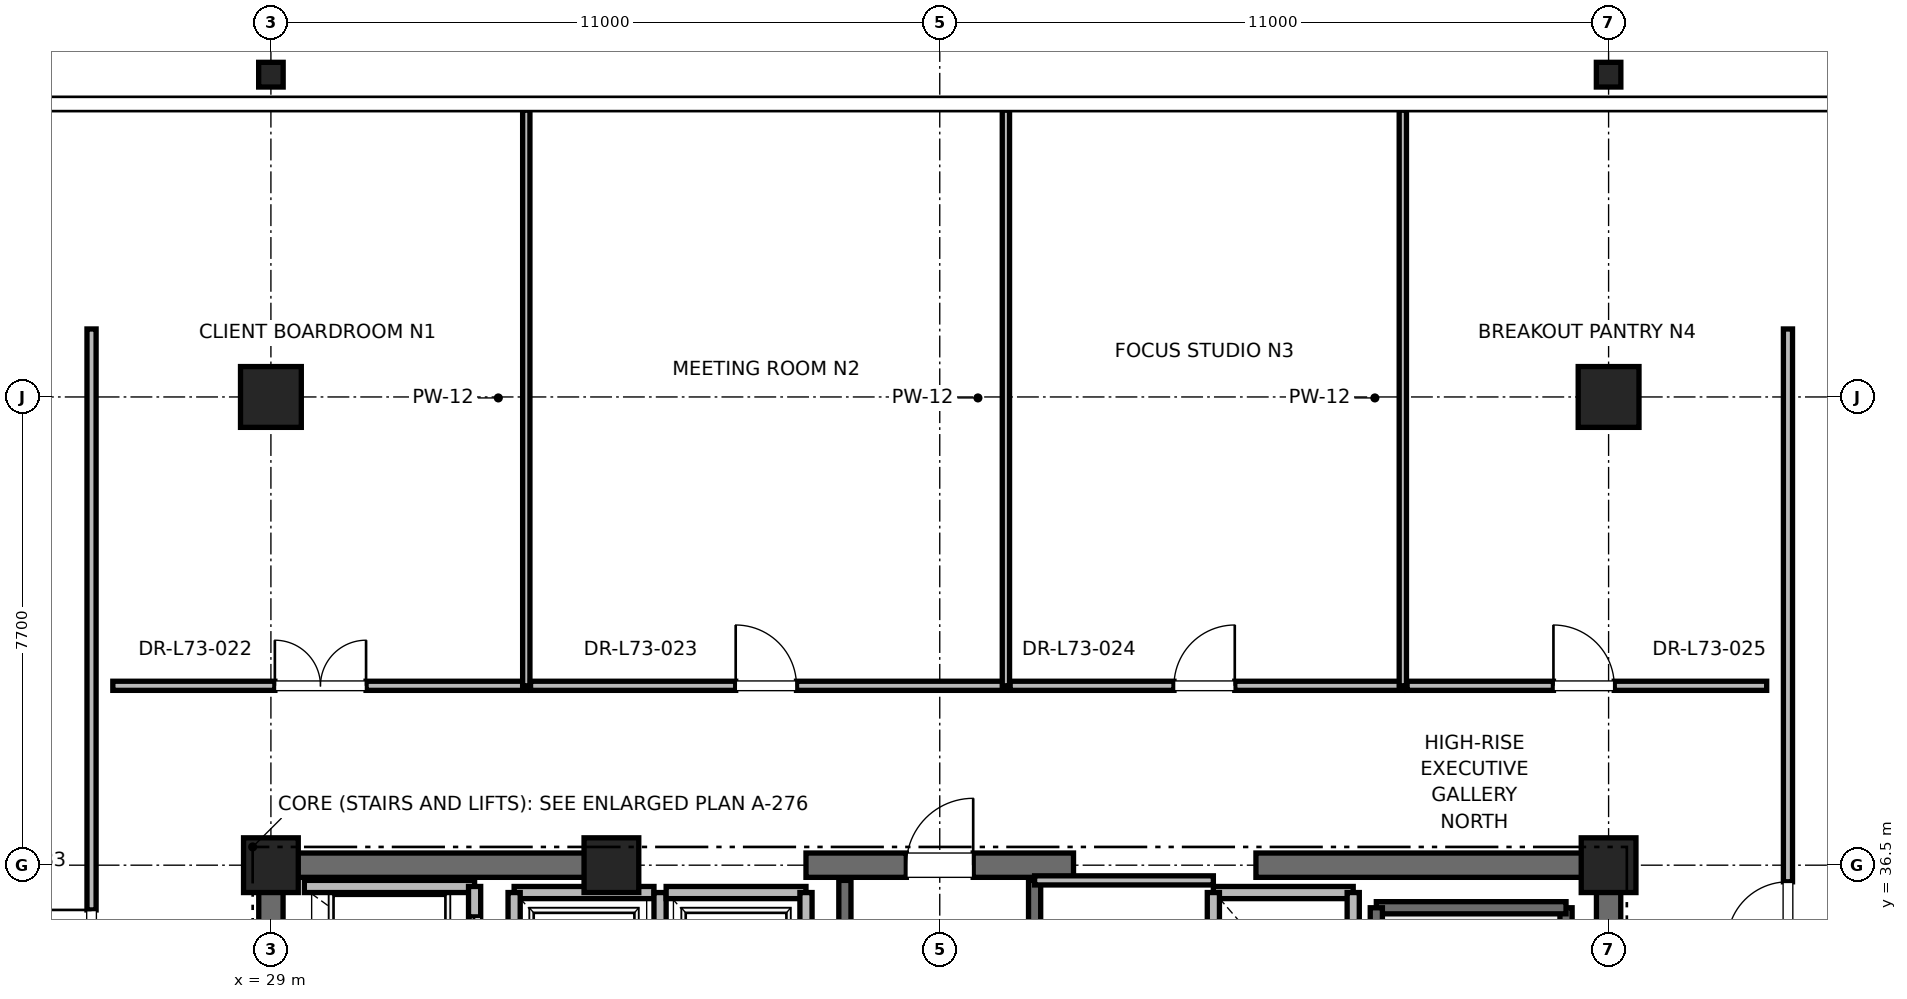
"""IFC4 building model, lengths in metres.
Left out: names, types, materials, properties, quantities, classifications, styles, units other than length and angle.
Written with IfcOpenShell. Run it as: python <this file> out.ifc"""

import sys

from ifc_helpers import new_model, si_unit, direction, frame, frame_2d, origin, origin_2d, place, context, subcontext, project, spatial, rectangle, i_section, extrude, element, fill, save


model = new_model("IFC4")
c1 = context("Model", 3, precision=1e-05, world=origin(), true_north=direction((0.0, 1.0)))
c2 = subcontext(c1, "Body", "Model", "MODEL_VIEW")
j1 = project(units=[si_unit("LENGTHUNIT", "METRE"), si_unit("PLANEANGLEUNIT", "RADIAN")], contexts=[c1])
p1 = place(None, origin())
s1 = spatial("IfcSite", under=j1, at=p1, CompositionType="ELEMENT")
p2 = place(p1, origin())
s2 = spatial("IfcBuilding", under=s1, at=p2, CompositionType="ELEMENT")
p3 = place(p2, frame((0.0, 0.0, 314.8)))
s3 = spatial("IfcBuildingStorey", under=s2, at=p3, CompositionType="ELEMENT", Elevation=314.8)
for number, where, z_axis, x_axis in (
    (1, (29.0, 44.2, 0.0), (0.0, 0.0, 1.0), (1.0, 0.0, 0.0)),
    (2, (51.0, 44.2, 0.0), (0.0, 0.0, 1.0), (1.0, 0.0, 0.0)),
):
    element("IfcColumn", number, at=place(p3, frame(where, z_axis=z_axis, x_axis=x_axis)), inside=s3, PredefinedType="COLUMN", context=c2, shape_type="SweptSolid", body=[
        extrude(rectangle(XDim=1.0, YDim=1.0, at=origin_2d()), origin(), (0.0, 0.0, 1.0), 4.0),
    ])
for number, where, z_axis, x_axis in (
    (3, (29.0, 49.5, 0.0), (0.0, 0.0, 1.0), (1.0, 0.0, 0.0)),
    (4, (51.0, 49.5, 0.0), (0.0, 0.0, 1.0), (1.0, 0.0, 0.0)),
):
    element("IfcColumn", number, at=place(p3, frame(where, z_axis=z_axis, x_axis=x_axis)), inside=s3, PredefinedType="COLUMN", context=c2, shape_type="SweptSolid", body=[
        extrude(i_section(OverallWidth=0.403, OverallDepth=0.406, WebThickness=0.027, FlangeThickness=0.043, FilletRadius=0.015, at=origin_2d()), origin(), (0.0, 0.0, 1.0), 4.0),
    ])
for number, where, z_axis, x_axis in (
    (5, (29.0, 36.5, 0.0), (0.0, 0.0, 1.0), (1.0, 0.0, 0.0)),
    (6, (51.0, 36.5, 0.0), (0.0, 0.0, 1.0), (1.0, 0.0, 0.0)),
    (7, (34.6, 36.5, 0.0), (0.0, 0.0, 1.0), (1.0, 0.0, 0.0)),
):
    element("IfcColumn", number, at=place(p3, frame(where, z_axis=z_axis, x_axis=x_axis)), inside=s3, PredefinedType="PILASTER", context=c2, shape_type="SweptSolid", body=[
        extrude(rectangle(XDim=0.9, YDim=0.9, at=origin_2d()), origin(), (0.0, 0.0, 1.0), 4.0),
    ])
p4 = place(p3, frame((29.0, 36.5, 0.0), z_axis=(0.0, 0.0, 1.0), x_axis=(1.0, 0.0, 0.0)))
e8 = element("IfcWall", 8, at=p4, inside=s3, PredefinedType="SHEAR", context=c2, shape_type="SweptSolid", body=[
    extrude(rectangle(XDim=5.8, YDim=0.4, at=frame_2d((2.9, 0.0))), origin(), (0.0, 0.0, 1.0), 3.785),
])
p5 = place(p3, frame((37.8, 36.5, 0.0), z_axis=(0.0, 0.0, 1.0), x_axis=(1.0, 0.0, 0.0)))
e9 = element("IfcWall", 9, at=p5, inside=s3, PredefinedType="SHEAR", context=c2, shape_type="SweptSolid", body=[
    extrude(rectangle(XDim=4.4, YDim=0.4, at=frame_2d((2.2, 0.0))), origin(), (0.0, 0.0, 1.0), 3.785),
])
p6 = place(p5, frame((1.65, 0.0, 0.0)))
e10 = element("IfcOpeningElement", 10, at=p6, cuts=e9, PredefinedType="OPENING", context=c2, shape_type="SweptSolid", body=[
    extrude(rectangle(XDim=1.1, YDim=2.15, at=frame_2d((0.55, 1.075))), frame((0.0, 0.2, 0.0), z_axis=(0.0, -1.0, 0.0), x_axis=(1.0, 0.0, 0.0)), (0.0, 0.0, 1.0), 0.4),
])
for number, where, z_axis, x_axis in (
    (11, (45.2, 36.5, 0.0), (0.0, 0.0, 1.0), (1.0, 0.0, 0.0)),
    (12, (29.0, 30.7, 0.0), (0.0, 0.0, 1.0), (0.0, 1.0, 0.0)),
):
    element("IfcWall", number, at=place(p3, frame(where, z_axis=z_axis, x_axis=x_axis)), inside=s3, PredefinedType="SHEAR", context=c2, shape_type="SweptSolid", body=[
        extrude(rectangle(XDim=5.8, YDim=0.4, at=frame_2d((2.9, 0.0))), origin(), (0.0, 0.0, 1.0), 3.785),
    ])
p7 = place(p3, frame((51.0, 27.7, 0.0), z_axis=(0.0, 0.0, 1.0), x_axis=(0.0, 1.0, 0.0)))
e13 = element("IfcWall", 13, at=p7, inside=s3, PredefinedType="SHEAR", context=c2, shape_type="SweptSolid", body=[
    extrude(rectangle(XDim=8.8, YDim=0.4, at=frame_2d((4.4, 0.0))), origin(), (0.0, 0.0, 1.0), 3.785),
])
p8 = place(p3, frame((50.3, 27.65, 0.0), z_axis=(0.0, 0.0, 1.0), x_axis=(0.0, 1.0, 0.0)))
e14 = element("IfcWall", 14, at=p8, inside=s3, PredefinedType="SOLIDWALL", context=c2, shape_type="SweptSolid", body=[
    extrude(rectangle(XDim=8.15, YDim=0.2, at=frame_2d((4.075, 0.0))), origin(), (0.0, 0.0, 1.0), 3.785),
])
p9 = place(p3, frame((47.18, 35.8, 0.0), z_axis=(0.0, 0.0, 1.0), x_axis=(1.0, 0.0, 0.0)))
e15 = element("IfcWall", 15, at=p9, inside=s3, PredefinedType="SOLIDWALL", context=c2, shape_type="SweptSolid", body=[
    extrude(rectangle(XDim=3.12, YDim=0.2, at=frame_2d((1.56, 0.0))), origin(), (0.0, 0.0, 1.0), 3.785),
])
p10 = place(p3, frame((47.18, 27.62, 0.0), z_axis=(0.0, 0.0, 1.0), x_axis=(0.0, 1.0, 0.0)))
e16 = element("IfcWall", 16, at=p10, inside=s3, PredefinedType="SOLIDWALL", context=c2, shape_type="SweptSolid", body=[
    extrude(rectangle(XDim=8.18, YDim=0.2, at=frame_2d((4.09, 0.0))), origin(), (0.0, 0.0, 1.0), 3.785),
])
p11 = place(p3, frame((38.44, 27.38, 0.0), z_axis=(0.0, 0.0, 1.0), x_axis=(0.0, 1.0, 0.0)))
e17 = element("IfcWall", 17, at=p11, inside=s3, PredefinedType="SOLIDWALL", context=c2, shape_type="SweptSolid", body=[
    extrude(rectangle(XDim=8.87, YDim=0.2, at=frame_2d((4.435, 0.0))), origin(), (0.0, 0.0, 1.0), 3.785),
])
p12 = place(p3, frame((41.56, 27.68, 0.0), z_axis=(0.0, 0.0, 1.0), x_axis=(0.0, 1.0, 0.0)))
e18 = element("IfcWall", 18, at=p12, inside=s3, PredefinedType="SOLIDWALL", context=c2, shape_type="SweptSolid", body=[
    extrude(rectangle(XDim=8.57, YDim=0.2, at=frame_2d((4.285, 0.0))), origin(), (0.0, 0.0, 1.0), 3.785),
])
p13 = place(p3, frame((32.35, 36.15, 0.0), z_axis=(0.0, 0.0, 1.0), x_axis=(-1.0, 0.0, 0.0)))
e19 = element("IfcWall", 19, at=p13, inside=s3, PredefinedType="SOLIDWALL", context=c2, shape_type="SweptSolid", body=[
    extrude(rectangle(XDim=2.8, YDim=0.2, at=frame_2d((1.4, 0.0))), origin(), (0.0, 0.0, 1.0), 3.22),
])
p14 = place(p3, frame((32.35, 34.05, 0.0), z_axis=(0.0, 0.0, 1.0), x_axis=(0.0, 1.0, 0.0)))
e20 = element("IfcWall", 20, at=p14, inside=s3, PredefinedType="SOLIDWALL", context=c2, shape_type="SweptSolid", body=[
    extrude(rectangle(XDim=2.1, YDim=0.2, at=frame_2d((1.05, 0.0))), origin(), (0.0, 0.0, 1.0), 3.785),
])
p15 = place(p14, frame((0.5, 0.0, 0.0)))
e21 = element("IfcOpeningElement", 21, at=p15, cuts=e20, PredefinedType="OPENING", context=c2, shape_type="SweptSolid", body=[
    extrude(rectangle(XDim=1.1, YDim=2.2, at=frame_2d((0.55, 1.1))), frame((0.0, 0.1, 0.0), z_axis=(0.0, -1.0, 0.0), x_axis=(1.0, 0.0, 0.0)), (0.0, 0.0, 1.0), 0.2),
])
p16 = place(p3, frame((35.3, 36.05, 0.0), z_axis=(0.0, 0.0, 1.0), x_axis=(-1.0, 0.0, 0.0)))
e22 = element("IfcWall", 22, at=p16, inside=s3, PredefinedType="SOLIDWALL", context=c2, shape_type="SweptSolid", body=[
    extrude(rectangle(XDim=2.3, YDim=0.2, at=frame_2d((1.15, 0.0))), origin(), (0.0, 0.0, 1.0), 2.865),
])
p17 = place(p3, frame((33.0, 36.05, 0.0), z_axis=(0.0, 0.0, 1.0), x_axis=(0.0, -1.0, 0.0)))
e23 = element("IfcWall", 23, at=p17, inside=s3, PredefinedType="SOLIDWALL", context=c2, shape_type="SweptSolid", body=[
    extrude(rectangle(XDim=2.6, YDim=0.2, at=frame_2d((1.3, 0.0))), origin(), (0.0, 0.0, 1.0), 3.785),
])
p18 = place(p3, frame((35.4, 33.45, 0.0), z_axis=(0.0, 0.0, 1.0), x_axis=(0.0, 1.0, 0.0)))
e24 = element("IfcWall", 24, at=p18, inside=s3, PredefinedType="SOLIDWALL", context=c2, shape_type="SweptSolid", body=[
    extrude(rectangle(XDim=2.6, YDim=0.2, at=frame_2d((1.3, 0.0))), origin(), (0.0, 0.0, 1.0), 2.865),
])
p19 = place(p3, frame((37.8, 36.05, 0.0), z_axis=(0.0, 0.0, 1.0), x_axis=(-1.0, 0.0, 0.0)))
e25 = element("IfcWall", 25, at=p19, inside=s3, PredefinedType="SOLIDWALL", context=c2, shape_type="SweptSolid", body=[
    extrude(rectangle(XDim=2.3, YDim=0.2, at=frame_2d((1.15, 0.0))), origin(), (0.0, 0.0, 1.0), 2.865),
])
p20 = place(p3, frame((37.8, 33.45, 0.0), z_axis=(0.0, 0.0, 1.0), x_axis=(0.0, 1.0, 0.0)))
e26 = element("IfcWall", 26, at=p20, inside=s3, PredefinedType="SOLIDWALL", context=c2, shape_type="SweptSolid", body=[
    extrude(rectangle(XDim=2.6, YDim=0.2, at=frame_2d((1.3, 0.0))), origin(), (0.0, 0.0, 1.0), 2.865),
])
p21 = place(p3, frame((46.8, 36.05, 0.0), z_axis=(0.0, 0.0, 1.0), x_axis=(-1.0, 0.0, 0.0)))
e27 = element("IfcWall", 27, at=p21, inside=s3, PredefinedType="SOLIDWALL", context=c2, shape_type="SweptSolid", body=[
    extrude(rectangle(XDim=2.3, YDim=0.2, at=frame_2d((1.15, 0.0))), origin(), (0.0, 0.0, 1.0), 2.865),
])
p22 = place(p3, frame((44.5, 36.05, 0.0), z_axis=(0.0, 0.0, 1.0), x_axis=(0.0, -1.0, 0.0)))
e28 = element("IfcWall", 28, at=p22, inside=s3, PredefinedType="SOLIDWALL", context=c2, shape_type="SweptSolid", body=[
    extrude(rectangle(XDim=2.6, YDim=0.2, at=frame_2d((1.3, 0.0))), origin(), (0.0, 0.0, 1.0), 2.865),
])
p23 = place(p3, frame((46.8, 33.45, 0.0), z_axis=(0.0, 0.0, 1.0), x_axis=(0.0, 1.0, 0.0)))
e29 = element("IfcWall", 29, at=p23, inside=s3, PredefinedType="SOLIDWALL", context=c2, shape_type="SweptSolid", body=[
    extrude(rectangle(XDim=2.6, YDim=0.2, at=frame_2d((1.3, 0.0))), origin(), (0.0, 0.0, 1.0), 3.785),
])
p24 = place(p3, frame((41.56, 36.25, 0.0), z_axis=(0.0, 0.0, 1.0), x_axis=(1.0, 0.0, 0.0)))
e30 = element("IfcWall", 30, at=p24, inside=s3, PredefinedType="PARTITIONING", context=c2, shape_type="SweptSolid", body=[
    extrude(rectangle(XDim=2.94, YDim=0.15, at=frame_2d((1.47, 0.0))), origin(), (0.0, 0.0, 1.0), 2.85),
])
p25 = place(p3, frame((26.4, 39.45, 0.0), z_axis=(0.0, 0.0, 1.0), x_axis=(1.0, 0.0, 0.0)))
e31 = element("IfcWall", 31, at=p25, inside=s3, PredefinedType="PARTITIONING", context=c2, shape_type="SweptSolid", body=[
    extrude(rectangle(XDim=6.8, YDim=0.15, at=frame_2d((3.4, 0.0))), origin(), (0.0, 0.0, 1.0), 2.85),
])
p26 = place(p25, frame((2.665, 0.0, 0.0)))
e32 = element("IfcOpeningElement", 32, at=p26, cuts=e31, PredefinedType="OPENING", context=c2, shape_type="SweptSolid", body=[
    extrude(rectangle(XDim=1.5, YDim=2.25, at=frame_2d((0.75, 1.125))), frame((0.0, 0.075, 0.0), z_axis=(0.0, -1.0, 0.0), x_axis=(1.0, 0.0, 0.0)), (0.0, 0.0, 1.0), 0.15),
])
p27 = place(p3, frame((33.2, 39.45, 0.0), z_axis=(0.0, 0.0, 1.0), x_axis=(0.0, 1.0, 0.0)))
e33 = element("IfcWall", 33, at=p27, inside=s3, PredefinedType="PARTITIONING", context=c2, shape_type="SweptSolid", body=[
    extrude(rectangle(XDim=9.468, YDim=0.12, at=frame_2d((4.734, 0.0))), origin(), (0.0, 0.0, 1.0), 2.415),
])
p28 = place(p3, frame((33.27, 39.45, 0.0), z_axis=(0.0, 0.0, 1.0), x_axis=(1.0, 0.0, 0.0)))
e34 = element("IfcWall", 34, at=p28, inside=s3, PredefinedType="PARTITIONING", context=c2, shape_type="SweptSolid", body=[
    extrude(rectangle(XDim=7.818, YDim=0.15, at=frame_2d((3.909, 0.0))), origin(), (0.0, 0.0, 1.0), 2.85),
])
p29 = place(p28, frame((3.374, 0.0, 0.0)))
e35 = element("IfcOpeningElement", 35, at=p29, cuts=e34, PredefinedType="OPENING", context=c2, shape_type="SweptSolid", body=[
    extrude(rectangle(XDim=1.0, YDim=2.15, at=frame_2d((0.5, 1.075))), frame((0.0, 0.075, 0.0), z_axis=(0.0, -1.0, 0.0), x_axis=(1.0, 0.0, 0.0)), (0.0, 0.0, 1.0), 0.15),
])
p30 = place(p3, frame((41.088, 39.45, 0.0), z_axis=(0.0, 0.0, 1.0), x_axis=(0.0, 1.0, 0.0)))
e36 = element("IfcWall", 36, at=p30, inside=s3, PredefinedType="PARTITIONING", context=c2, shape_type="SweptSolid", body=[
    extrude(rectangle(XDim=9.468, YDim=0.12, at=frame_2d((4.734, 0.0))), origin(), (0.0, 0.0, 1.0), 2.415),
])
p31 = place(p3, frame((41.158, 39.45, 0.0), z_axis=(0.0, 0.0, 1.0), x_axis=(1.0, 0.0, 0.0)))
e37 = element("IfcWall", 37, at=p31, inside=s3, PredefinedType="PARTITIONING", context=c2, shape_type="SweptSolid", body=[
    extrude(rectangle(XDim=6.458, YDim=0.15, at=frame_2d((3.229, 0.0))), origin(), (0.0, 0.0, 1.0), 2.85),
])
p32 = place(p31, frame((2.694, 0.0, 0.0)))
e38 = element("IfcOpeningElement", 38, at=p32, cuts=e37, PredefinedType="OPENING", context=c2, shape_type="SweptSolid", body=[
    extrude(rectangle(XDim=1.0, YDim=2.15, at=frame_2d((0.5, 1.075))), frame((0.0, 0.075, 0.0), z_axis=(0.0, -1.0, 0.0), x_axis=(1.0, 0.0, 0.0)), (0.0, 0.0, 1.0), 0.15),
])
p33 = place(p3, frame((47.616, 39.45, 0.0), z_axis=(0.0, 0.0, 1.0), x_axis=(0.0, 1.0, 0.0)))
e39 = element("IfcWall", 39, at=p33, inside=s3, PredefinedType="PARTITIONING", context=c2, shape_type="SweptSolid", body=[
    extrude(rectangle(XDim=9.468, YDim=0.12, at=frame_2d((4.734, 0.0))), origin(), (0.0, 0.0, 1.0), 2.415),
])
p34 = place(p3, frame((47.686, 39.45, 0.0), z_axis=(0.0, 0.0, 1.0), x_axis=(1.0, 0.0, 0.0)))
e40 = element("IfcWall", 40, at=p34, inside=s3, PredefinedType="PARTITIONING", context=c2, shape_type="SweptSolid", body=[
    extrude(rectangle(XDim=5.914, YDim=0.15, at=frame_2d((2.957, 0.0))), origin(), (0.0, 0.0, 1.0), 2.85),
])
p35 = place(p34, frame((2.407, 0.0, 0.0)))
e41 = element("IfcOpeningElement", 41, at=p35, cuts=e40, PredefinedType="OPENING", context=c2, shape_type="SweptSolid", body=[
    extrude(rectangle(XDim=1.0, YDim=2.15, at=frame_2d((0.5, 1.075))), frame((0.0, 0.075, 0.0), z_axis=(0.0, -1.0, 0.0), x_axis=(1.0, 0.0, 0.0)), (0.0, 0.0, 1.0), 0.15),
])
p36 = place(p3, frame((26.05, 33.628, 0.0), z_axis=(0.0, 0.0, 1.0), x_axis=(0.0, 1.0, 0.0)))
e42 = element("IfcWall", 42, at=p36, inside=s3, PredefinedType="PARTITIONING", context=c2, shape_type="SweptSolid", body=[
    extrude(rectangle(XDim=11.69, YDim=0.15, at=frame_2d((5.845, 0.0))), origin(), (0.0, 0.0, 1.0), 2.85),
])
p37 = place(p36, frame((0.636, 0.0, 0.0)))
e43 = element("IfcOpeningElement", 43, at=p37, cuts=e42, PredefinedType="OPENING", context=c2, shape_type="SweptSolid", body=[
    extrude(rectangle(XDim=1.5, YDim=2.25, at=frame_2d((0.75, 1.125))), frame((0.0, 0.075, 0.0), z_axis=(0.0, -1.0, 0.0), x_axis=(1.0, 0.0, 0.0)), (0.0, 0.0, 1.0), 0.15),
])
p38 = place(p3, frame((53.95, 35.054, 0.0), z_axis=(0.0, 0.0, 1.0), x_axis=(0.0, 1.0, 0.0)))
e44 = element("IfcWall", 44, at=p38, inside=s3, PredefinedType="PARTITIONING", context=c2, shape_type="SweptSolid", body=[
    extrude(rectangle(XDim=10.264, YDim=0.15, at=frame_2d((5.132, 0.0))), origin(), (0.0, 0.0, 1.0), 2.85),
])
p39 = place(p38, frame((0.173, 0.0, 0.0)))
e45 = element("IfcOpeningElement", 45, at=p39, cuts=e44, PredefinedType="OPENING", context=c2, shape_type="SweptSolid", body=[
    extrude(rectangle(XDim=1.0, YDim=2.15, at=frame_2d((0.5, 1.075))), frame((0.0, 0.075, 0.0), z_axis=(0.0, -1.0, 0.0), x_axis=(1.0, 0.0, 0.0)), (0.0, 0.0, 1.0), 0.15),
])
p40 = place(p6, origin())
e46 = element("IfcDoor", 46, at=p40, inside=s3, OperationType="SINGLE_SWING_RIGHT", PredefinedType="DOOR", context=c2, shape_type="SweptSolid", body=[
    extrude(rectangle(XDim=1.1, YDim=2.15, at=frame_2d((0.55, 1.075))), frame((0.0, 0.025, 0.0), z_axis=(0.0, -1.0, 0.0), x_axis=(1.0, 0.0, 0.0)), (0.0, 0.0, 1.0), 0.05),
])
fill(e10, e46)
p41 = place(p15, origin())
e47 = element("IfcDoor", 47, at=p41, inside=s3, OperationType="SLIDING_TO_RIGHT", PredefinedType="DOOR", context=c2, shape_type="SweptSolid", body=[
    extrude(rectangle(XDim=1.1, YDim=2.2, at=frame_2d((0.55, 1.1))), frame((0.0, 0.025, 0.0), z_axis=(0.0, -1.0, 0.0), x_axis=(1.0, 0.0, 0.0)), (0.0, 0.0, 1.0), 0.05),
])
fill(e21, e47)
p42 = place(p26, origin())
e48 = element("IfcDoor", 48, at=p42, inside=s3, OperationType="DOUBLE_DOOR_SINGLE_SWING", PredefinedType="DOOR", context=c2, shape_type="SweptSolid", body=[
    extrude(rectangle(XDim=1.5, YDim=2.25, at=frame_2d((0.75, 1.125))), frame((0.0, 0.025, 0.0), z_axis=(0.0, -1.0, 0.0), x_axis=(1.0, 0.0, 0.0)), (0.0, 0.0, 1.0), 0.05),
])
fill(e32, e48)
p43 = place(p29, origin())
e49 = element("IfcDoor", 49, at=p43, inside=s3, OperationType="SINGLE_SWING_LEFT", PredefinedType="DOOR", context=c2, shape_type="SweptSolid", body=[
    extrude(rectangle(XDim=1.0, YDim=2.15, at=frame_2d((0.5, 1.075))), frame((0.0, 0.025, 0.0), z_axis=(0.0, -1.0, 0.0), x_axis=(1.0, 0.0, 0.0)), (0.0, 0.0, 1.0), 0.05),
])
fill(e35, e49)
p44 = place(p32, origin())
e50 = element("IfcDoor", 50, at=p44, inside=s3, OperationType="SINGLE_SWING_RIGHT", PredefinedType="DOOR", context=c2, shape_type="SweptSolid", body=[
    extrude(rectangle(XDim=1.0, YDim=2.15, at=frame_2d((0.5, 1.075))), frame((0.0, 0.025, 0.0), z_axis=(0.0, -1.0, 0.0), x_axis=(1.0, 0.0, 0.0)), (0.0, 0.0, 1.0), 0.05),
])
fill(e38, e50)
p45 = place(p35, origin())
e51 = element("IfcDoor", 51, at=p45, inside=s3, OperationType="SINGLE_SWING_LEFT", PredefinedType="DOOR", context=c2, shape_type="SweptSolid", body=[
    extrude(rectangle(XDim=1.0, YDim=2.15, at=frame_2d((0.5, 1.075))), frame((0.0, 0.025, 0.0), z_axis=(0.0, -1.0, 0.0), x_axis=(1.0, 0.0, 0.0)), (0.0, 0.0, 1.0), 0.05),
])
fill(e41, e51)
p46 = place(p37, origin())
e52 = element("IfcDoor", 52, at=p46, inside=s3, OperationType="DOUBLE_DOOR_SINGLE_SWING", PredefinedType="DOOR", context=c2, shape_type="SweptSolid", body=[
    extrude(rectangle(XDim=1.5, YDim=2.25, at=frame_2d((0.75, 1.125))), frame((0.0, 0.025, 0.0), z_axis=(0.0, -1.0, 0.0), x_axis=(1.0, 0.0, 0.0)), (0.0, 0.0, 1.0), 0.05),
])
fill(e43, e52)
p47 = place(p39, origin())
e53 = element("IfcDoor", 53, at=p47, inside=s3, OperationType="SINGLE_SWING_LEFT", PredefinedType="DOOR", context=c2, shape_type="SweptSolid", body=[
    extrude(rectangle(XDim=1.0, YDim=2.15, at=frame_2d((0.5, 1.075))), frame((0.0, 0.025, 0.0), z_axis=(0.0, -1.0, 0.0), x_axis=(1.0, 0.0, 0.0)), (0.0, 0.0, 1.0), 0.05),
])
fill(e45, e53)
save(model, sys.argv[1])
